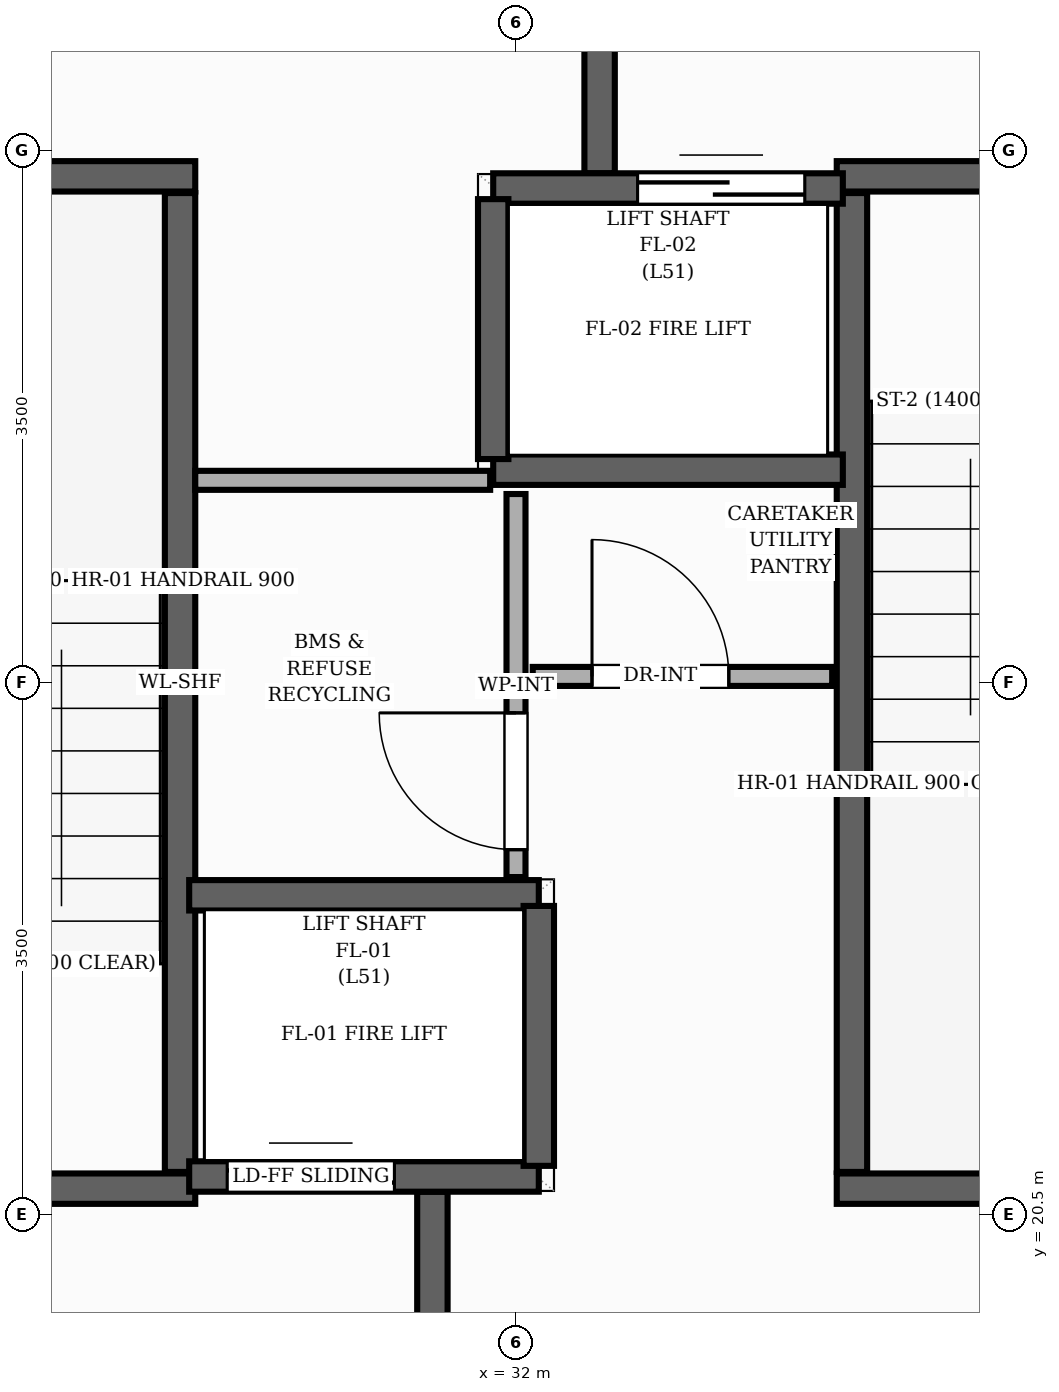
"""IFC4 building model, lengths in metres.
Left out: names, types, materials, properties, quantities, classifications, styles, units other than length and angle.
Written with IfcOpenShell. Run it as: python <this file> out.ifc"""

import sys

from ifc_helpers import new_model, si_unit, direction, frame, frame_2d, origin, place, context, subcontext, project, spatial, rectangle, extrude, element, fill, save


model = new_model("IFC4")
c1 = context("Model", 3, precision=1e-05, world=origin(), true_north=direction((0.0, 1.0)))
c2 = subcontext(c1, "Body", "Model", "MODEL_VIEW")
j1 = project(units=[si_unit("LENGTHUNIT", "METRE"), si_unit("PLANEANGLEUNIT", "RADIAN")], contexts=[c1])
p1 = place(None, origin())
s1 = spatial("IfcSite", under=j1, at=p1, CompositionType="ELEMENT")
p2 = place(p1, origin())
s2 = spatial("IfcBuilding", under=s1, at=p2, CompositionType="ELEMENT")
p3 = place(p2, frame((0.0, 0.0, 169.44)))
s3 = spatial("IfcBuildingStorey", under=s2, at=p3, CompositionType="ELEMENT", Elevation=169.44)
p4 = place(p3, frame((29.79, 20.78, 0.0), z_axis=(0.0, 0.0, 1.0), x_axis=(0.0, 1.0, 0.0)))
e1 = element("IfcWall", 1, at=p4, inside=s3, PredefinedType="SHEAR", context=c2, shape_type="SweptSolid", body=[
    extrude(rectangle(XDim=6.44, YDim=0.2, at=frame_2d((3.22, 0.0))), origin(), (0.0, 0.0, 1.0), 3.2),
])
p5 = place(p3, frame((26.65, 27.33, 0.0), z_axis=(0.0, 0.0, 1.0), x_axis=(1.0, 0.0, 0.0)))
e2 = element("IfcWall", 2, at=p5, inside=s3, PredefinedType="SHEAR", context=c2, shape_type="SweptSolid", body=[
    extrude(rectangle(XDim=3.24, YDim=0.2, at=frame_2d((1.62, 0.0))), origin(), (0.0, 0.0, 1.0), 3.2),
])
p6 = place(p3, frame((26.65, 20.67, 0.0), z_axis=(0.0, 0.0, 1.0), x_axis=(1.0, 0.0, 0.0)))
e3 = element("IfcWall", 3, at=p6, inside=s3, PredefinedType="SHEAR", context=c2, shape_type="SweptSolid", body=[
    extrude(rectangle(XDim=3.24, YDim=0.2, at=frame_2d((1.62, 0.0))), origin(), (0.0, 0.0, 1.0), 3.2),
])
p7 = place(p6, frame((1.055, 0.0, 0.0)))
e4 = element("IfcOpeningElement", 4, at=p7, cuts=e3, PredefinedType="OPENING", context=c2, shape_type="SweptSolid", body=[
    extrude(rectangle(XDim=1.05, YDim=2.15, at=frame_2d((0.525, 1.075))), frame((0.0, 0.11, 0.0), z_axis=(0.0, -1.0, 0.0), x_axis=(1.0, 0.0, 0.0)), (0.0, 0.0, 1.0), 0.22),
])
p8 = place(p3, frame((34.21, 20.78, 0.0), z_axis=(0.0, 0.0, 1.0), x_axis=(0.0, 1.0, 0.0)))
e5 = element("IfcWall", 5, at=p8, inside=s3, PredefinedType="SHEAR", context=c2, shape_type="SweptSolid", body=[
    extrude(rectangle(XDim=6.44, YDim=0.2, at=frame_2d((3.22, 0.0))), origin(), (0.0, 0.0, 1.0), 3.2),
])
p9 = place(p3, frame((34.11, 20.67, 0.0), z_axis=(0.0, 0.0, 1.0), x_axis=(1.0, 0.0, 0.0)))
e6 = element("IfcWall", 6, at=p9, inside=s3, PredefinedType="SHEAR", context=c2, shape_type="SweptSolid", body=[
    extrude(rectangle(XDim=3.24, YDim=0.2, at=frame_2d((1.62, 0.0))), origin(), (0.0, 0.0, 1.0), 3.2),
])
p10 = place(p3, frame((34.11, 27.33, 0.0), z_axis=(0.0, 0.0, 1.0), x_axis=(1.0, 0.0, 0.0)))
e7 = element("IfcWall", 7, at=p10, inside=s3, PredefinedType="SHEAR", context=c2, shape_type="SweptSolid", body=[
    extrude(rectangle(XDim=3.24, YDim=0.2, at=frame_2d((1.62, 0.0))), origin(), (0.0, 0.0, 1.0), 3.2),
])
p11 = place(p10, frame((1.135, 0.0, 0.0)))
e8 = element("IfcOpeningElement", 8, at=p11, cuts=e7, PredefinedType="OPENING", context=c2, shape_type="SweptSolid", body=[
    extrude(rectangle(XDim=1.05, YDim=2.15, at=frame_2d((0.525, 1.075))), frame((0.0, 0.11, 0.0), z_axis=(0.0, -1.0, 0.0), x_axis=(1.0, 0.0, 0.0)), (0.0, 0.0, 1.0), 0.22),
])
for number, where, z_axis, x_axis in (
    (9, (31.45, 17.15, 0.0), (0.0, 0.0, 1.0), (0.0, 1.0, 0.0)),
    (10, (32.55, 27.35, 0.0), (0.0, 0.0, 1.0), (0.0, 1.0, 0.0)),
):
    element("IfcWall", number, at=place(p3, frame(where, z_axis=z_axis, x_axis=x_axis)), inside=s3, PredefinedType="SHEAR", context=c2, shape_type="SweptSolid", body=[
        extrude(rectangle(XDim=3.5, YDim=0.2, at=frame_2d((1.75, 0.0))), origin(), (0.0, 0.0, 1.0), 3.2),
    ])
p12 = place(p3, frame((29.85, 20.75, 0.0), z_axis=(0.0, 0.0, 1.0), x_axis=(1.0, 0.0, 0.0)))
e11 = element("IfcWall", 11, at=p12, inside=s3, PredefinedType="SHEAR", context=c2, shape_type="SweptSolid", body=[
    extrude(rectangle(XDim=2.3, YDim=0.2, at=frame_2d((1.15, 0.0))), origin(), (0.0, 0.0, 1.0), 3.2),
])
p13 = place(p12, frame((0.25, 0.0, 0.0)))
e12 = element("IfcOpeningElement", 12, at=p13, cuts=e11, PredefinedType="OPENING", context=c2, shape_type="SweptSolid", body=[
    extrude(rectangle(XDim=1.1, YDim=2.15, at=frame_2d((0.55, 1.075))), frame((0.0, 0.11, 0.0), z_axis=(0.0, -1.0, 0.0), x_axis=(1.0, 0.0, 0.0)), (0.0, 0.0, 1.0), 0.22),
])
p14 = place(p3, frame((29.85, 22.6, 0.0), z_axis=(0.0, 0.0, 1.0), x_axis=(1.0, 0.0, 0.0)))
e13 = element("IfcWall", 13, at=p14, inside=s3, PredefinedType="SHEAR", context=c2, shape_type="SweptSolid", body=[
    extrude(rectangle(XDim=2.3, YDim=0.2, at=frame_2d((1.15, 0.0))), origin(), (0.0, 0.0, 1.0), 3.2),
])
p15 = place(p3, frame((32.15, 20.82, 0.0), z_axis=(0.0, 0.0, 1.0), x_axis=(0.0, 1.0, 0.0)))
e14 = element("IfcWall", 14, at=p15, inside=s3, PredefinedType="SHEAR", context=c2, shape_type="SweptSolid", body=[
    extrude(rectangle(XDim=1.71, YDim=0.2, at=frame_2d((0.855, 0.0))), origin(), (0.0, 0.0, 1.0), 3.2),
])
p16 = place(p3, frame((31.85, 27.25, 0.0), z_axis=(0.0, 0.0, 1.0), x_axis=(1.0, 0.0, 0.0)))
e15 = element("IfcWall", 15, at=p16, inside=s3, PredefinedType="SHEAR", context=c2, shape_type="SweptSolid", body=[
    extrude(rectangle(XDim=2.3, YDim=0.2, at=frame_2d((1.15, 0.0))), origin(), (0.0, 0.0, 1.0), 3.2),
])
p17 = place(p16, frame((0.95, 0.0, 0.0)))
e16 = element("IfcOpeningElement", 16, at=p17, cuts=e15, PredefinedType="OPENING", context=c2, shape_type="SweptSolid", body=[
    extrude(rectangle(XDim=1.1, YDim=2.15, at=frame_2d((0.55, 1.075))), frame((0.0, 0.11, 0.0), z_axis=(0.0, -1.0, 0.0), x_axis=(1.0, 0.0, 0.0)), (0.0, 0.0, 1.0), 0.22),
])
p18 = place(p3, frame((31.85, 25.4, 0.0), z_axis=(0.0, 0.0, 1.0), x_axis=(1.0, 0.0, 0.0)))
e17 = element("IfcWall", 17, at=p18, inside=s3, PredefinedType="SHEAR", context=c2, shape_type="SweptSolid", body=[
    extrude(rectangle(XDim=2.3, YDim=0.2, at=frame_2d((1.15, 0.0))), origin(), (0.0, 0.0, 1.0), 3.2),
])
p19 = place(p3, frame((31.85, 25.47, 0.0), z_axis=(0.0, 0.0, 1.0), x_axis=(0.0, 1.0, 0.0)))
e18 = element("IfcWall", 18, at=p19, inside=s3, PredefinedType="SHEAR", context=c2, shape_type="SweptSolid", body=[
    extrude(rectangle(XDim=1.71, YDim=0.2, at=frame_2d((0.855, 0.0))), origin(), (0.0, 0.0, 1.0), 3.2),
])
p20 = place(p3, frame((32.0, 22.72, 0.0), z_axis=(0.0, 0.0, 1.0), x_axis=(0.0, 1.0, 0.0)))
e19 = element("IfcWall", 19, at=p20, inside=s3, PredefinedType="PARTITIONING", context=c2, shape_type="SweptSolid", body=[
    extrude(rectangle(XDim=2.52, YDim=0.125, at=frame_2d((1.26, 0.0))), origin(), (0.0, 0.0, 1.0), 2.955),
])
p21 = place(p20, frame((0.18, 0.0, 0.0)))
e20 = element("IfcOpeningElement", 20, at=p21, cuts=e19, PredefinedType="OPENING", context=c2, shape_type="SweptSolid", body=[
    extrude(rectangle(XDim=0.9, YDim=2.1, at=frame_2d((0.45, 1.05))), frame((0.0, 0.073, 0.0), z_axis=(0.0, -1.0, 0.0), x_axis=(1.0, 0.0, 0.0)), (0.0, 0.0, 1.0), 0.145),
])
p22 = place(p3, frame((32.11, 24.04, 0.0), z_axis=(0.0, 0.0, 1.0), x_axis=(1.0, 0.0, 0.0)))
e21 = element("IfcWall", 21, at=p22, inside=s3, PredefinedType="PARTITIONING", context=c2, shape_type="SweptSolid", body=[
    extrude(rectangle(XDim=1.97, YDim=0.125, at=frame_2d((0.985, 0.0))), origin(), (0.0, 0.0, 1.0), 2.955),
])
p23 = place(p22, frame((0.39, 0.0, 0.0)))
e22 = element("IfcOpeningElement", 22, at=p23, cuts=e21, PredefinedType="OPENING", context=c2, shape_type="SweptSolid", body=[
    extrude(rectangle(XDim=0.9, YDim=2.1, at=frame_2d((0.45, 1.05))), frame((0.0, 0.073, 0.0), z_axis=(0.0, -1.0, 0.0), x_axis=(1.0, 0.0, 0.0)), (0.0, 0.0, 1.0), 0.145),
])
p24 = place(p3, frame((29.89, 25.33, 0.0), z_axis=(0.0, 0.0, 1.0), x_axis=(1.0, 0.0, 0.0)))
e23 = element("IfcWall", 23, at=p24, inside=s3, PredefinedType="PARTITIONING", context=c2, shape_type="SweptSolid", body=[
    extrude(rectangle(XDim=1.94, YDim=0.125, at=frame_2d((0.97, 0.0))), origin(), (0.0, 0.0, 1.0), 2.955),
])
p25 = place(p13, origin())
e24 = element("IfcDoor", 24, at=p25, inside=s3, OperationType="DOUBLE_DOOR_SLIDING", PredefinedType="DOOR", context=c2, shape_type="SweptSolid", body=[
    extrude(rectangle(XDim=1.1, YDim=2.15, at=frame_2d((0.55, 1.075))), frame((0.0, 0.025, 0.0), z_axis=(0.0, -1.0, 0.0), x_axis=(1.0, 0.0, 0.0)), (0.0, 0.0, 1.0), 0.05),
])
fill(e12, e24)
p26 = place(p17, origin())
e25 = element("IfcDoor", 25, at=p26, inside=s3, OperationType="DOUBLE_DOOR_SLIDING", PredefinedType="DOOR", context=c2, shape_type="SweptSolid", body=[
    extrude(rectangle(XDim=1.1, YDim=2.15, at=frame_2d((0.55, 1.075))), frame((0.0, 0.025, 0.0), z_axis=(0.0, -1.0, 0.0), x_axis=(1.0, 0.0, 0.0)), (0.0, 0.0, 1.0), 0.05),
])
fill(e16, e25)
p27 = place(p23, origin())
e26 = element("IfcDoor", 26, at=p27, inside=s3, OperationType="SINGLE_SWING_LEFT", PredefinedType="DOOR", context=c2, shape_type="SweptSolid", body=[
    extrude(rectangle(XDim=0.9, YDim=2.1, at=frame_2d((0.45, 1.05))), frame((0.0, 0.025, 0.0), z_axis=(0.0, -1.0, 0.0), x_axis=(1.0, 0.0, 0.0)), (0.0, 0.0, 1.0), 0.05),
])
fill(e22, e26)
p28 = place(p21, origin())
e27 = element("IfcDoor", 27, at=p28, inside=s3, OperationType="SINGLE_SWING_RIGHT", PredefinedType="DOOR", context=c2, shape_type="SweptSolid", body=[
    extrude(rectangle(XDim=0.9, YDim=2.1, at=frame_2d((0.45, 1.05))), frame((0.0, 0.025, 0.0), z_axis=(0.0, -1.0, 0.0), x_axis=(1.0, 0.0, 0.0)), (0.0, 0.0, 1.0), 0.05),
])
fill(e20, e27)
save(model, sys.argv[1])
